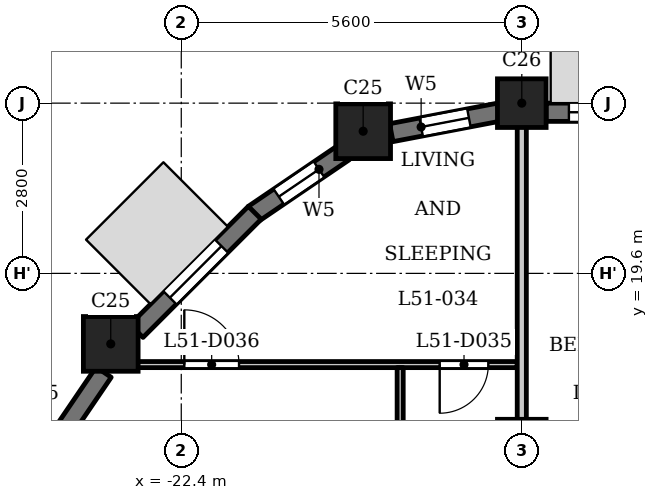
"""IFC4 building model, lengths in metres.
Left out: names, types, materials, properties, quantities, classifications, styles, units other than length and angle.
Written with IfcOpenShell. Run it as: python <this file> out.ifc"""

import sys

from ifc_helpers import new_model, si_unit, direction, frame, frame_2d, origin, origin_2d, place, context, subcontext, project, spatial, rectangle, extrude, element, fill, save


model = new_model("IFC4")
c1 = context("Model", 3, precision=1e-05, world=origin(), true_north=direction((0.0, 1.0)))
c2 = subcontext(c1, "Body", "Model", "MODEL_VIEW")
j1 = project(units=[si_unit("LENGTHUNIT", "METRE"), si_unit("PLANEANGLEUNIT", "RADIAN")], contexts=[c1])
p1 = place(None, origin())
s1 = spatial("IfcSite", under=j1, at=p1, CompositionType="ELEMENT")
p2 = place(p1, origin())
s2 = spatial("IfcBuilding", under=s1, at=p2, CompositionType="ELEMENT")
p3 = place(p2, frame((0.0, 0.0, 199.4)))
s3 = spatial("IfcBuildingStorey", under=s2, at=p3, CompositionType="ELEMENT", Elevation=199.4)
for number, where, z_axis, x_axis in (
    (1, (-19.409, 21.938, 0.0), (0.0, 0.0, 1.0), (1.0, 0.0, 0.0)),
    (2, (-23.56, 18.44, 0.0), (0.0, 0.0, 1.0), (1.0, 0.0, 0.0)),
):
    element("IfcColumn", number, at=place(p3, frame(where, z_axis=z_axis, x_axis=x_axis)), inside=s3, PredefinedType="COLUMN", context=c2, shape_type="SweptSolid", body=[
        extrude(rectangle(XDim=0.9, YDim=0.9, at=origin_2d()), origin(), (0.0, 0.0, 1.0), 3.5),
    ])
for number, where, z_axis, x_axis in (
    (3, (-16.8, 16.8, 0.0), (0.0, 0.0, 1.0), (1.0, 0.0, 0.0)),
    (4, (-16.8, 22.4, 0.0), (0.0, 0.0, 1.0), (1.0, 0.0, 0.0)),
):
    element("IfcColumn", number, at=place(p3, frame(where, z_axis=z_axis, x_axis=x_axis)), inside=s3, PredefinedType="COLUMN", context=c2, shape_type="SweptSolid", body=[
        extrude(rectangle(XDim=0.8, YDim=0.8, at=origin_2d()), origin(), (0.0, 0.0, 1.0), 3.5),
    ])
p4 = place(p3, frame((-14.45, 22.25, 0.0), z_axis=(0.0, 0.0, 1.0), x_axis=(-1.0, 0.0, 0.0)))
e5 = element("IfcWall", 5, at=p4, inside=s3, PredefinedType="SOLIDWALL", context=c2, shape_type="SweptSolid", body=[
    extrude(rectangle(XDim=1.95, YDim=0.3, at=frame_2d((0.975, 0.0))), origin(), (0.0, 0.0, 1.0), 2.5),
])
p5 = place(p4, frame((0.375, 0.0, 0.6)))
e6 = element("IfcOpeningElement", 6, at=p5, cuts=e5, PredefinedType="OPENING", context=c2, shape_type="SweptSolid", body=[
    extrude(rectangle(XDim=1.2, YDim=1.55, at=frame_2d((0.6, 0.775))), frame((0.0, 0.16, 0.0), z_axis=(0.0, -1.0, 0.0), x_axis=(1.0, 0.0, 0.0)), (0.0, 0.0, 1.0), 0.32),
])
p6 = place(p3, frame((-17.179, 22.251, 0.0), z_axis=(0.0, 0.0, 1.0), x_axis=(-0.98230529033, -0.187286722942, 0.0)))
e7 = element("IfcWall", 7, at=p6, inside=s3, PredefinedType="SOLIDWALL", context=c2, shape_type="SweptSolid", body=[
    extrude(rectangle(XDim=1.799, YDim=0.3, at=frame_2d((0.899, 0.0))), origin(), (0.0, 0.0, 1.0), 2.5),
])
p7 = place(p6, frame((0.5, 0.0, 0.6)))
e8 = element("IfcOpeningElement", 8, at=p7, cuts=e7, PredefinedType="OPENING", context=c2, shape_type="SweptSolid", body=[
    extrude(rectangle(XDim=0.8, YDim=1.55, at=frame_2d((0.4, 0.775))), frame((0.0, 0.16, 0.0), z_axis=(0.0, -1.0, 0.0), x_axis=(1.0, 0.0, 0.0)), (0.0, 0.0, 1.0), 0.32),
])
p8 = place(p3, frame((-19.719, 21.594, 0.0), z_axis=(0.0, 0.0, 1.0), x_axis=(-0.827067282455, -0.562102935673, 0.0)))
e9 = element("IfcWall", 9, at=p8, inside=s3, PredefinedType="SOLIDWALL", context=c2, shape_type="SweptSolid", body=[
    extrude(rectangle(XDim=1.806, YDim=0.3, at=frame_2d((0.903, 0.0))), origin(), (0.0, 0.0, 1.0), 2.5),
])
p9 = place(p8, frame((0.503, 0.0, 0.6)))
e10 = element("IfcOpeningElement", 10, at=p9, cuts=e9, PredefinedType="OPENING", context=c2, shape_type="SweptSolid", body=[
    extrude(rectangle(XDim=0.8, YDim=1.55, at=frame_2d((0.4, 0.775))), frame((0.0, 0.16, 0.0), z_axis=(0.0, -1.0, 0.0), x_axis=(1.0, 0.0, 0.0)), (0.0, 0.0, 1.0), 0.32),
])
p10 = place(p3, frame((-21.191, 20.597, 0.0), z_axis=(0.0, 0.0, 1.0), x_axis=(-0.707106781187, -0.707106781187, 0.0)))
e11 = element("IfcWall", 11, at=p10, inside=s3, PredefinedType="SOLIDWALL", context=c2, shape_type="SweptSolid", body=[
    extrude(rectangle(XDim=2.75, YDim=0.3, at=frame_2d((1.375, 0.0))), origin(), (0.0, 0.0, 1.0), 2.5),
])
p11 = place(p10, frame((0.775, 0.0, 0.6)))
e12 = element("IfcOpeningElement", 12, at=p11, cuts=e11, PredefinedType="OPENING", context=c2, shape_type="SweptSolid", body=[
    extrude(rectangle(XDim=1.2, YDim=1.55, at=frame_2d((0.6, 0.775))), frame((0.0, 0.16, 0.0), z_axis=(0.0, -1.0, 0.0), x_axis=(1.0, 0.0, 0.0)), (0.0, 0.0, 1.0), 0.32),
])
p12 = place(p3, frame((-23.676, 17.975, 0.0), z_axis=(0.0, 0.0, 1.0), x_axis=(-0.56200149592, -0.827136215253, 0.0)))
e13 = element("IfcWall", 13, at=p12, inside=s3, PredefinedType="SOLIDWALL", context=c2, shape_type="SweptSolid", body=[
    extrude(rectangle(XDim=1.277, YDim=0.3, at=frame_2d((0.639, 0.0))), origin(), (0.0, 0.0, 1.0), 2.5),
])
p13 = place(p3, frame((-23.64, 18.1, 0.0), z_axis=(0.0, 0.0, 1.0), x_axis=(1.0, 0.0, 0.0)))
e14 = element("IfcWall", 14, at=p13, inside=s3, PredefinedType="PARTITIONING", context=c2, shape_type="SweptSolid", body=[
    extrude(rectangle(XDim=6.765, YDim=0.1, at=frame_2d((3.382, 0.0))), origin(), (0.0, 0.0, 1.0), 3.2),
])
p14 = place(p13, frame((5.49, 0.0, 0.0)))
e15 = element("IfcOpeningElement", 15, at=p14, cuts=e14, PredefinedType="OPENING", context=c2, shape_type="SweptSolid", body=[
    extrude(rectangle(XDim=0.8, YDim=2.1, at=frame_2d((0.4, 1.05))), frame((0.0, 0.06, 0.0), z_axis=(0.0, -1.0, 0.0), x_axis=(1.0, 0.0, 0.0)), (0.0, 0.0, 1.0), 0.12),
])
p15 = place(p13, frame((1.29, 0.0, 0.0)))
e16 = element("IfcOpeningElement", 16, at=p15, cuts=e14, PredefinedType="OPENING", context=c2, shape_type="SweptSolid", body=[
    extrude(rectangle(XDim=0.9, YDim=2.1, at=frame_2d((0.45, 1.05))), frame((0.0, 0.06, 0.0), z_axis=(0.0, -1.0, 0.0), x_axis=(1.0, 0.0, 0.0)), (0.0, 0.0, 1.0), 0.12),
])
p16 = place(p3, frame((-18.8, 15.475, 0.0), z_axis=(0.0, 0.0, 1.0), x_axis=(0.0, 1.0, 0.0)))
e17 = element("IfcWall", 17, at=p16, inside=s3, PredefinedType="PARTITIONING", context=c2, shape_type="SweptSolid", body=[
    extrude(rectangle(XDim=2.575, YDim=0.1, at=frame_2d((1.288, 0.0))), origin(), (0.0, 0.0, 1.0), 3.2),
])
p17 = place(p3, frame((-16.8, 15.475, 0.0), z_axis=(0.0, 0.0, 1.0), x_axis=(0.0, 1.0, 0.0)))
e18 = element("IfcWall", 18, at=p17, inside=s3, PredefinedType="PARTITIONING", context=c2, shape_type="SweptSolid", body=[
    extrude(rectangle(XDim=6.835, YDim=0.15, at=frame_2d((3.417, 0.0))), origin(), (0.0, 0.0, 1.0), 2.55),
])
p18 = place(p14, origin())
e19 = element("IfcDoor", 19, at=p18, inside=s3, OperationType="SINGLE_SWING_LEFT", PredefinedType="DOOR", context=c2, shape_type="SweptSolid", body=[
    extrude(rectangle(XDim=0.8, YDim=2.1, at=frame_2d((0.4, 1.05))), frame((0.0, 0.025, 0.0), z_axis=(0.0, -1.0, 0.0), x_axis=(1.0, 0.0, 0.0)), (0.0, 0.0, 1.0), 0.05),
])
fill(e15, e19)
p19 = place(p15, origin())
e20 = element("IfcDoor", 20, at=p19, inside=s3, OperationType="SINGLE_SWING_RIGHT", PredefinedType="DOOR", context=c2, shape_type="SweptSolid", body=[
    extrude(rectangle(XDim=0.9, YDim=2.1, at=frame_2d((0.45, 1.05))), frame((0.0, 0.025, 0.0), z_axis=(0.0, -1.0, 0.0), x_axis=(1.0, 0.0, 0.0)), (0.0, 0.0, 1.0), 0.05),
])
fill(e16, e20)
p20 = place(p5, origin())
e21 = element("IfcWindow", 21, at=p20, inside=s3, PartitioningType="SINGLE_PANEL", PredefinedType="WINDOW", context=c2, shape_type="SweptSolid", body=[
    extrude(rectangle(XDim=1.2, YDim=1.55, at=frame_2d((0.6, 0.775))), frame((0.0, 0.03, 0.0), z_axis=(0.0, -1.0, 0.0), x_axis=(1.0, 0.0, 0.0)), (0.0, 0.0, 1.0), 0.06),
])
fill(e6, e21)
p21 = place(p7, origin())
e22 = element("IfcWindow", 22, at=p21, inside=s3, PartitioningType="SINGLE_PANEL", PredefinedType="WINDOW", context=c2, shape_type="SweptSolid", body=[
    extrude(rectangle(XDim=0.8, YDim=1.55, at=frame_2d((0.4, 0.775))), frame((0.0, 0.03, 0.0), z_axis=(0.0, -1.0, 0.0), x_axis=(1.0, 0.0, 0.0)), (0.0, 0.0, 1.0), 0.06),
])
fill(e8, e22)
p22 = place(p9, origin())
e23 = element("IfcWindow", 23, at=p22, inside=s3, PartitioningType="SINGLE_PANEL", PredefinedType="WINDOW", context=c2, shape_type="SweptSolid", body=[
    extrude(rectangle(XDim=0.8, YDim=1.55, at=frame_2d((0.4, 0.775))), frame((0.0, 0.03, 0.0), z_axis=(0.0, -1.0, 0.0), x_axis=(1.0, 0.0, 0.0)), (0.0, 0.0, 1.0), 0.06),
])
fill(e10, e23)
p23 = place(p11, origin())
e24 = element("IfcWindow", 24, at=p23, inside=s3, PartitioningType="SINGLE_PANEL", PredefinedType="WINDOW", context=c2, shape_type="SweptSolid", body=[
    extrude(rectangle(XDim=1.2, YDim=1.55, at=frame_2d((0.6, 0.775))), frame((0.0, 0.03, 0.0), z_axis=(0.0, -1.0, 0.0), x_axis=(1.0, 0.0, 0.0)), (0.0, 0.0, 1.0), 0.06),
])
fill(e12, e24)
save(model, sys.argv[1])
